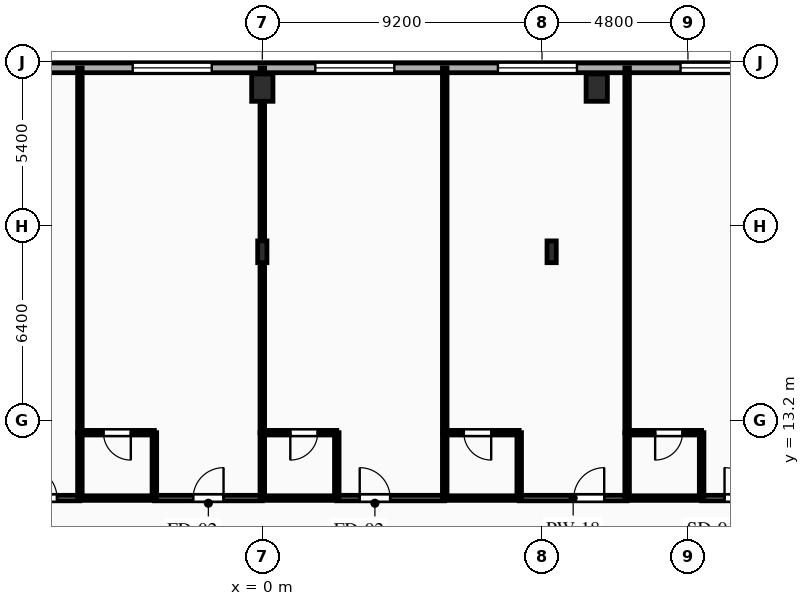
"""IFC4 building model, lengths in metres.
Left out: names, types, materials, properties, quantities, classifications, styles, units other than length and angle.
Written with IfcOpenShell. Run it as: python <this file> out.ifc"""

import sys

from ifc_helpers import new_model, si_unit, direction, frame, frame_2d, origin, origin_2d, place, context, subcontext, project, spatial, rectangle, i_section, extrude, element, fill, save


model = new_model("IFC4")
c1 = context("Model", 3, precision=1e-05, world=origin(), true_north=direction((0.0, 1.0)))
c2 = subcontext(c1, "Body", "Model", "MODEL_VIEW")
j1 = project(units=[si_unit("LENGTHUNIT", "METRE"), si_unit("PLANEANGLEUNIT", "RADIAN")], contexts=[c1])
p1 = place(None, origin())
s1 = spatial("IfcSite", under=j1, at=p1, CompositionType="ELEMENT")
p2 = place(p1, origin())
s2 = spatial("IfcBuilding", under=s1, at=p2, CompositionType="ELEMENT")
p3 = place(p2, frame((0.0, 0.0, 22.5)))
s3 = spatial("IfcBuildingStorey", under=s2, at=p3, CompositionType="ELEMENT", Elevation=22.5)
for number, where, z_axis, x_axis in (
    (1, (0.0, 24.15, 0.0), (0.0, 0.0, 1.0), (1.0, 0.0, 0.0)),
    (2, (11.0, 24.15, 0.0), (0.0, 0.0, 1.0), (1.0, 0.0, 0.0)),
):
    element("IfcColumn", number, at=place(p3, frame(where, z_axis=z_axis, x_axis=x_axis)), inside=s3, PredefinedType="COLUMN", context=c2, shape_type="SweptSolid", body=[
        extrude(rectangle(XDim=0.7, YDim=0.9, at=origin_2d()), origin(), (0.0, 0.0, 1.0), 4.5),
    ])
for number, where, z_axis, x_axis in (
    (3, (9.517, 18.75, 0.0), (0.0, 0.0, 1.0), (1.0, 0.0, 0.0)),
    (4, (0.0, 18.75, 0.0), (0.0, 0.0, 1.0), (1.0, 0.0, 0.0)),
):
    element("IfcColumn", number, at=place(p3, frame(where, z_axis=z_axis, x_axis=x_axis)), inside=s3, PredefinedType="COLUMN", context=c2, shape_type="SweptSolid", body=[
        extrude(i_section(OverallWidth=0.304, OverallDepth=0.716, WebThickness=0.021, FlangeThickness=0.04, FilletRadius=0.027, at=origin_2d()), origin(), (0.0, 0.0, 1.0), 4.5),
    ])
p4 = place(p3, frame((-36.8, 24.8, 0.0), z_axis=(0.0, 0.0, 1.0), x_axis=(1.0, 0.0, 0.0)))
e5 = element("IfcWall", 5, at=p4, inside=s3, PredefinedType="SOLIDWALL", context=c2, shape_type="SweptSolid", body=[
    extrude(rectangle(XDim=73.6, YDim=0.32, at=frame_2d((36.8, 0.0))), origin(), (0.0, 0.0, 1.0), 4.16),
])
p5 = place(p4, frame((1.079, 0.0, 0.85)))
e6 = element("IfcOpeningElement", 6, at=p5, cuts=e5, PredefinedType="OPENING", context=c2, shape_type="SweptSolid", body=[
    extrude(rectangle(XDim=2.3, YDim=2.4, at=frame_2d((1.15, 1.2))), frame((0.0, 0.17, 0.0), z_axis=(0.0, -1.0, 0.0), x_axis=(1.0, 0.0, 0.0)), (0.0, 0.0, 1.0), 0.34),
])
p6 = place(p4, frame((8.431, 0.0, 0.85)))
e7 = element("IfcOpeningElement", 7, at=p6, cuts=e5, PredefinedType="OPENING", context=c2, shape_type="SweptSolid", body=[
    extrude(rectangle(XDim=2.6, YDim=2.4, at=frame_2d((1.3, 1.2))), frame((0.0, 0.17, 0.0), z_axis=(0.0, -1.0, 0.0), x_axis=(1.0, 0.0, 0.0)), (0.0, 0.0, 1.0), 0.34),
])
p7 = place(p4, frame((13.316, 0.0, 0.85)))
e8 = element("IfcOpeningElement", 8, at=p7, cuts=e5, PredefinedType="OPENING", context=c2, shape_type="SweptSolid", body=[
    extrude(rectangle(XDim=1.1, YDim=1.85, at=frame_2d((0.55, 0.925))), frame((0.0, 0.17, 0.0), z_axis=(0.0, -1.0, 0.0), x_axis=(1.0, 0.0, 0.0)), (0.0, 0.0, 1.0), 0.34),
])
p8 = place(p4, frame((16.339, 0.0, 0.85)))
e9 = element("IfcOpeningElement", 9, at=p8, cuts=e5, PredefinedType="OPENING", context=c2, shape_type="SweptSolid", body=[
    extrude(rectangle(XDim=2.0, YDim=2.4, at=frame_2d((1.0, 1.2))), frame((0.0, 0.17, 0.0), z_axis=(0.0, -1.0, 0.0), x_axis=(1.0, 0.0, 0.0)), (0.0, 0.0, 1.0), 0.34),
])
p9 = place(p4, frame((21.875, 0.0, 0.85)))
e10 = element("IfcOpeningElement", 10, at=p9, cuts=e5, PredefinedType="OPENING", context=c2, shape_type="SweptSolid", body=[
    extrude(rectangle(XDim=2.3, YDim=2.4, at=frame_2d((1.15, 1.2))), frame((0.0, 0.17, 0.0), z_axis=(0.0, -1.0, 0.0), x_axis=(1.0, 0.0, 0.0)), (0.0, 0.0, 1.0), 0.34),
])
p10 = place(p4, frame((26.53, 0.0, 0.85)))
e11 = element("IfcOpeningElement", 11, at=p10, cuts=e5, PredefinedType="OPENING", context=c2, shape_type="SweptSolid", body=[
    extrude(rectangle(XDim=2.6, YDim=2.4, at=frame_2d((1.3, 1.2))), frame((0.0, 0.17, 0.0), z_axis=(0.0, -1.0, 0.0), x_axis=(1.0, 0.0, 0.0)), (0.0, 0.0, 1.0), 0.34),
])
p11 = place(p4, frame((32.537, 0.0, 0.85)))
e12 = element("IfcOpeningElement", 12, at=p11, cuts=e5, PredefinedType="OPENING", context=c2, shape_type="SweptSolid", body=[
    extrude(rectangle(XDim=2.6, YDim=2.4, at=frame_2d((1.3, 1.2))), frame((0.0, 0.17, 0.0), z_axis=(0.0, -1.0, 0.0), x_axis=(1.0, 0.0, 0.0)), (0.0, 0.0, 1.0), 0.34),
])
p12 = place(p4, frame((38.543, 0.0, 0.85)))
e13 = element("IfcOpeningElement", 13, at=p12, cuts=e5, PredefinedType="OPENING", context=c2, shape_type="SweptSolid", body=[
    extrude(rectangle(XDim=2.6, YDim=2.4, at=frame_2d((1.3, 1.2))), frame((0.0, 0.17, 0.0), z_axis=(0.0, -1.0, 0.0), x_axis=(1.0, 0.0, 0.0)), (0.0, 0.0, 1.0), 0.34),
])
p13 = place(p4, frame((44.55, 0.0, 0.85)))
e14 = element("IfcOpeningElement", 14, at=p13, cuts=e5, PredefinedType="OPENING", context=c2, shape_type="SweptSolid", body=[
    extrude(rectangle(XDim=2.6, YDim=2.4, at=frame_2d((1.3, 1.2))), frame((0.0, 0.17, 0.0), z_axis=(0.0, -1.0, 0.0), x_axis=(1.0, 0.0, 0.0)), (0.0, 0.0, 1.0), 0.34),
])
p14 = place(p4, frame((50.556, 0.0, 0.85)))
e15 = element("IfcOpeningElement", 15, at=p14, cuts=e5, PredefinedType="OPENING", context=c2, shape_type="SweptSolid", body=[
    extrude(rectangle(XDim=2.6, YDim=2.4, at=frame_2d((1.3, 1.2))), frame((0.0, 0.17, 0.0), z_axis=(0.0, -1.0, 0.0), x_axis=(1.0, 0.0, 0.0)), (0.0, 0.0, 1.0), 0.34),
])
p15 = place(p4, frame((55.341, 0.0, 0.85)))
e16 = element("IfcOpeningElement", 16, at=p15, cuts=e5, PredefinedType="OPENING", context=c2, shape_type="SweptSolid", body=[
    extrude(rectangle(XDim=2.0, YDim=2.4, at=frame_2d((1.0, 1.2))), frame((0.0, 0.17, 0.0), z_axis=(0.0, -1.0, 0.0), x_axis=(1.0, 0.0, 0.0)), (0.0, 0.0, 1.0), 0.34),
])
p16 = place(p4, frame((59.16, 0.0, 0.85)))
e17 = element("IfcOpeningElement", 17, at=p16, cuts=e5, PredefinedType="OPENING", context=c2, shape_type="SweptSolid", body=[
    extrude(rectangle(XDim=1.1, YDim=1.85, at=frame_2d((0.55, 0.925))), frame((0.0, 0.17, 0.0), z_axis=(0.0, -1.0, 0.0), x_axis=(1.0, 0.0, 0.0)), (0.0, 0.0, 1.0), 0.34),
])
p17 = place(p4, frame((62.649, 0.0, 0.85)))
e18 = element("IfcOpeningElement", 18, at=p17, cuts=e5, PredefinedType="OPENING", context=c2, shape_type="SweptSolid", body=[
    extrude(rectangle(XDim=2.6, YDim=2.4, at=frame_2d((1.3, 1.2))), frame((0.0, 0.17, 0.0), z_axis=(0.0, -1.0, 0.0), x_axis=(1.0, 0.0, 0.0)), (0.0, 0.0, 1.0), 0.34),
])
p18 = place(p4, frame((70.301, 0.0, 0.85)))
e19 = element("IfcOpeningElement", 19, at=p18, cuts=e5, PredefinedType="OPENING", context=c2, shape_type="SweptSolid", body=[
    extrude(rectangle(XDim=2.3, YDim=2.4, at=frame_2d((1.15, 1.2))), frame((0.0, 0.17, 0.0), z_axis=(0.0, -1.0, 0.0), x_axis=(1.0, 0.0, 0.0)), (0.0, 0.0, 1.0), 0.34),
])
p19 = place(p3, frame((-9.55, 10.65, 0.0), z_axis=(0.0, 0.0, 1.0), x_axis=(1.0, 0.0, 0.0)))
e20 = element("IfcWall", 20, at=p19, inside=s3, PredefinedType="PARTITIONING", context=c2, shape_type="SweptSolid", body=[
    extrude(rectangle(XDim=3.55, YDim=0.18, at=frame_2d((1.775, 0.0))), origin(), (0.0, 0.0, 1.0), 4.16),
])
p20 = place(p19, frame((1.796, 0.0, 0.0)))
e21 = element("IfcOpeningElement", 21, at=p20, cuts=e20, PredefinedType="OPENING", context=c2, shape_type="SweptSolid", body=[
    extrude(rectangle(XDim=1.0, YDim=2.15, at=frame_2d((0.5, 1.075))), frame((0.0, 0.1, 0.0), z_axis=(0.0, -1.0, 0.0), x_axis=(1.0, 0.0, 0.0)), (0.0, 0.0, 1.0), 0.2),
])
p21 = place(p3, frame((-3.55, 10.65, 0.0), z_axis=(0.0, 0.0, 1.0), x_axis=(1.0, 0.0, 0.0)))
e22 = element("IfcWall", 22, at=p21, inside=s3, PredefinedType="PARTITIONING", context=c2, shape_type="SweptSolid", body=[
    extrude(rectangle(XDim=3.55, YDim=0.18, at=frame_2d((1.775, 0.0))), origin(), (0.0, 0.0, 1.0), 4.16),
])
p22 = place(p21, frame((1.275, 0.0, 0.0)))
e23 = element("IfcOpeningElement", 23, at=p22, cuts=e22, PredefinedType="OPENING", context=c2, shape_type="SweptSolid", body=[
    extrude(rectangle(XDim=1.0, YDim=2.15, at=frame_2d((0.5, 1.075))), frame((0.0, 0.1, 0.0), z_axis=(0.0, -1.0, 0.0), x_axis=(1.0, 0.0, 0.0)), (0.0, 0.0, 1.0), 0.2),
])
p23 = place(p3, frame((-6.0, 10.65, 0.0), z_axis=(0.0, 0.0, 1.0), x_axis=(1.0, 0.0, 0.0)))
e24 = element("IfcWall", 24, at=p23, inside=s3, PredefinedType="PLUMBINGWALL", context=c2, shape_type="SweptSolid", body=[
    extrude(rectangle(XDim=2.45, YDim=0.15, at=frame_2d((1.225, 0.0))), origin(), (0.0, 0.0, 1.0), 4.16),
])
p24 = place(p3, frame((2.45, 10.65, 0.0), z_axis=(0.0, 0.0, 1.0), x_axis=(1.0, 0.0, 0.0)))
e25 = element("IfcWall", 25, at=p24, inside=s3, PredefinedType="PARTITIONING", context=c2, shape_type="SweptSolid", body=[
    extrude(rectangle(XDim=3.55, YDim=0.18, at=frame_2d((1.775, 0.0))), origin(), (0.0, 0.0, 1.0), 4.16),
])
p25 = place(p24, frame((0.754, 0.0, 0.0)))
e26 = element("IfcOpeningElement", 26, at=p25, cuts=e25, PredefinedType="OPENING", context=c2, shape_type="SweptSolid", body=[
    extrude(rectangle(XDim=1.0, YDim=2.15, at=frame_2d((0.5, 1.075))), frame((0.0, 0.1, 0.0), z_axis=(0.0, -1.0, 0.0), x_axis=(1.0, 0.0, 0.0)), (0.0, 0.0, 1.0), 0.2),
])
p26 = place(p3, frame((0.0, 10.65, 0.0), z_axis=(0.0, 0.0, 1.0), x_axis=(1.0, 0.0, 0.0)))
e27 = element("IfcWall", 27, at=p26, inside=s3, PredefinedType="PLUMBINGWALL", context=c2, shape_type="SweptSolid", body=[
    extrude(rectangle(XDim=2.45, YDim=0.15, at=frame_2d((1.225, 0.0))), origin(), (0.0, 0.0, 1.0), 4.16),
])
p27 = place(p3, frame((8.45, 10.65, 0.0), z_axis=(0.0, 0.0, 1.0), x_axis=(1.0, 0.0, 0.0)))
e28 = element("IfcWall", 28, at=p27, inside=s3, PredefinedType="PARTITIONING", context=c2, shape_type="SweptSolid", body=[
    extrude(rectangle(XDim=3.55, YDim=0.18, at=frame_2d((1.775, 0.0))), origin(), (0.0, 0.0, 1.0), 4.16),
])
p28 = place(p27, frame((1.796, 0.0, 0.0)))
e29 = element("IfcOpeningElement", 29, at=p28, cuts=e28, PredefinedType="OPENING", context=c2, shape_type="SweptSolid", body=[
    extrude(rectangle(XDim=1.0, YDim=2.15, at=frame_2d((0.5, 1.075))), frame((0.0, 0.1, 0.0), z_axis=(0.0, -1.0, 0.0), x_axis=(1.0, 0.0, 0.0)), (0.0, 0.0, 1.0), 0.2),
])
p29 = place(p3, frame((6.0, 10.65, 0.0), z_axis=(0.0, 0.0, 1.0), x_axis=(1.0, 0.0, 0.0)))
e30 = element("IfcWall", 30, at=p29, inside=s3, PredefinedType="PLUMBINGWALL", context=c2, shape_type="SweptSolid", body=[
    extrude(rectangle(XDim=2.45, YDim=0.15, at=frame_2d((1.225, 0.0))), origin(), (0.0, 0.0, 1.0), 4.16),
])
p30 = place(p3, frame((14.45, 10.65, 0.0), z_axis=(0.0, 0.0, 1.0), x_axis=(1.0, 0.0, 0.0)))
e31 = element("IfcWall", 31, at=p30, inside=s3, PredefinedType="PARTITIONING", context=c2, shape_type="SweptSolid", body=[
    extrude(rectangle(XDim=3.55, YDim=0.18, at=frame_2d((1.775, 0.0))), origin(), (0.0, 0.0, 1.0), 4.16),
])
p31 = place(p30, frame((0.754, 0.0, 0.0)))
e32 = element("IfcOpeningElement", 32, at=p31, cuts=e31, PredefinedType="OPENING", context=c2, shape_type="SweptSolid", body=[
    extrude(rectangle(XDim=1.0, YDim=2.15, at=frame_2d((0.5, 1.075))), frame((0.0, 0.1, 0.0), z_axis=(0.0, -1.0, 0.0), x_axis=(1.0, 0.0, 0.0)), (0.0, 0.0, 1.0), 0.2),
])
p32 = place(p3, frame((12.0, 10.65, 0.0), z_axis=(0.0, 0.0, 1.0), x_axis=(1.0, 0.0, 0.0)))
e33 = element("IfcWall", 33, at=p32, inside=s3, PredefinedType="PLUMBINGWALL", context=c2, shape_type="SweptSolid", body=[
    extrude(rectangle(XDim=2.45, YDim=0.15, at=frame_2d((1.225, 0.0))), origin(), (0.0, 0.0, 1.0), 4.16),
])
p33 = place(p3, frame((-6.0, 24.8, 0.0), z_axis=(0.0, 0.0, 1.0), x_axis=(0.0, -1.0, 0.0)))
e34 = element("IfcWall", 34, at=p33, inside=s3, PredefinedType="PARTITIONING", context=c2, shape_type="SweptSolid", body=[
    extrude(rectangle(XDim=12.0, YDim=0.15, at=frame_2d((6.0, 0.0))), origin(), (0.0, 0.0, 1.0), 4.16),
])
p34 = place(p3, frame((-6.0, 12.8, 0.0), z_axis=(0.0, 0.0, 1.0), x_axis=(0.0, -1.0, 0.0)))
e35 = element("IfcWall", 35, at=p34, inside=s3, PredefinedType="PLUMBINGWALL", context=c2, shape_type="SweptSolid", body=[
    extrude(rectangle(XDim=2.15, YDim=0.15, at=frame_2d((1.075, 0.0))), origin(), (0.0, 0.0, 1.0), 4.16),
])
p35 = place(p3, frame((-3.55, 12.8, 0.0), z_axis=(0.0, 0.0, 1.0), x_axis=(-1.0, 0.0, 0.0)))
e36 = element("IfcWall", 36, at=p35, inside=s3, PredefinedType="PLUMBINGWALL", context=c2, shape_type="SweptSolid", body=[
    extrude(rectangle(XDim=2.45, YDim=0.15, at=frame_2d((1.225, 0.0))), origin(), (0.0, 0.0, 1.0), 4.16),
])
p36 = place(p35, frame((0.775, 0.0, 0.0)))
e37 = element("IfcOpeningElement", 37, at=p36, cuts=e36, PredefinedType="OPENING", context=c2, shape_type="SweptSolid", body=[
    extrude(rectangle(XDim=0.9, YDim=2.1, at=frame_2d((0.45, 1.05))), frame((0.0, 0.085, 0.0), z_axis=(0.0, -1.0, 0.0), x_axis=(1.0, 0.0, 0.0)), (0.0, 0.0, 1.0), 0.17),
])
p37 = place(p3, frame((-3.55, 10.65, 0.0), z_axis=(0.0, 0.0, 1.0), x_axis=(0.0, 1.0, 0.0)))
e38 = element("IfcWall", 38, at=p37, inside=s3, PredefinedType="PLUMBINGWALL", context=c2, shape_type="SweptSolid", body=[
    extrude(rectangle(XDim=2.15, YDim=0.15, at=frame_2d((1.075, 0.0))), origin(), (0.0, 0.0, 1.0), 4.16),
])
p38 = place(p3, frame((0.0, 24.8, 0.0), z_axis=(0.0, 0.0, 1.0), x_axis=(0.0, -1.0, 0.0)))
e39 = element("IfcWall", 39, at=p38, inside=s3, PredefinedType="PARTITIONING", context=c2, shape_type="SweptSolid", body=[
    extrude(rectangle(XDim=12.0, YDim=0.15, at=frame_2d((6.0, 0.0))), origin(), (0.0, 0.0, 1.0), 3.545),
])
p39 = place(p3, frame((0.0, 12.8, 0.0), z_axis=(0.0, 0.0, 1.0), x_axis=(0.0, -1.0, 0.0)))
e40 = element("IfcWall", 40, at=p39, inside=s3, PredefinedType="PLUMBINGWALL", context=c2, shape_type="SweptSolid", body=[
    extrude(rectangle(XDim=2.15, YDim=0.15, at=frame_2d((1.075, 0.0))), origin(), (0.0, 0.0, 1.0), 4.16),
])
p40 = place(p3, frame((2.45, 12.8, 0.0), z_axis=(0.0, 0.0, 1.0), x_axis=(-1.0, 0.0, 0.0)))
e41 = element("IfcWall", 41, at=p40, inside=s3, PredefinedType="PLUMBINGWALL", context=c2, shape_type="SweptSolid", body=[
    extrude(rectangle(XDim=2.45, YDim=0.15, at=frame_2d((1.225, 0.0))), origin(), (0.0, 0.0, 1.0), 4.16),
])
p41 = place(p40, frame((0.629, 0.0, 0.0)))
e42 = element("IfcOpeningElement", 42, at=p41, cuts=e41, PredefinedType="OPENING", context=c2, shape_type="SweptSolid", body=[
    extrude(rectangle(XDim=0.9, YDim=2.1, at=frame_2d((0.45, 1.05))), frame((0.0, 0.085, 0.0), z_axis=(0.0, -1.0, 0.0), x_axis=(1.0, 0.0, 0.0)), (0.0, 0.0, 1.0), 0.17),
])
p42 = place(p3, frame((2.45, 10.65, 0.0), z_axis=(0.0, 0.0, 1.0), x_axis=(0.0, 1.0, 0.0)))
e43 = element("IfcWall", 43, at=p42, inside=s3, PredefinedType="PLUMBINGWALL", context=c2, shape_type="SweptSolid", body=[
    extrude(rectangle(XDim=2.15, YDim=0.15, at=frame_2d((1.075, 0.0))), origin(), (0.0, 0.0, 1.0), 4.16),
])
p43 = place(p3, frame((6.0, 24.8, 0.0), z_axis=(0.0, 0.0, 1.0), x_axis=(0.0, -1.0, 0.0)))
e44 = element("IfcWall", 44, at=p43, inside=s3, PredefinedType="PARTITIONING", context=c2, shape_type="SweptSolid", body=[
    extrude(rectangle(XDim=12.0, YDim=0.15, at=frame_2d((6.0, 0.0))), origin(), (0.0, 0.0, 1.0), 4.16),
])
p44 = place(p3, frame((6.0, 12.8, 0.0), z_axis=(0.0, 0.0, 1.0), x_axis=(0.0, -1.0, 0.0)))
e45 = element("IfcWall", 45, at=p44, inside=s3, PredefinedType="PLUMBINGWALL", context=c2, shape_type="SweptSolid", body=[
    extrude(rectangle(XDim=2.15, YDim=0.15, at=frame_2d((1.075, 0.0))), origin(), (0.0, 0.0, 1.0), 4.16),
])
p45 = place(p3, frame((8.45, 12.8, 0.0), z_axis=(0.0, 0.0, 1.0), x_axis=(-1.0, 0.0, 0.0)))
e46 = element("IfcWall", 46, at=p45, inside=s3, PredefinedType="PLUMBINGWALL", context=c2, shape_type="SweptSolid", body=[
    extrude(rectangle(XDim=2.45, YDim=0.15, at=frame_2d((1.225, 0.0))), origin(), (0.0, 0.0, 1.0), 4.16),
])
p46 = place(p45, frame((0.921, 0.0, 0.0)))
e47 = element("IfcOpeningElement", 47, at=p46, cuts=e46, PredefinedType="OPENING", context=c2, shape_type="SweptSolid", body=[
    extrude(rectangle(XDim=0.9, YDim=2.1, at=frame_2d((0.45, 1.05))), frame((0.0, 0.085, 0.0), z_axis=(0.0, -1.0, 0.0), x_axis=(1.0, 0.0, 0.0)), (0.0, 0.0, 1.0), 0.17),
])
p47 = place(p3, frame((8.45, 10.65, 0.0), z_axis=(0.0, 0.0, 1.0), x_axis=(0.0, 1.0, 0.0)))
e48 = element("IfcWall", 48, at=p47, inside=s3, PredefinedType="PLUMBINGWALL", context=c2, shape_type="SweptSolid", body=[
    extrude(rectangle(XDim=2.15, YDim=0.15, at=frame_2d((1.075, 0.0))), origin(), (0.0, 0.0, 1.0), 4.16),
])
p48 = place(p3, frame((12.0, 24.8, 0.0), z_axis=(0.0, 0.0, 1.0), x_axis=(0.0, -1.0, 0.0)))
e49 = element("IfcWall", 49, at=p48, inside=s3, PredefinedType="PARTITIONING", context=c2, shape_type="SweptSolid", body=[
    extrude(rectangle(XDim=12.0, YDim=0.15, at=frame_2d((6.0, 0.0))), origin(), (0.0, 0.0, 1.0), 4.16),
])
p49 = place(p3, frame((12.0, 12.8, 0.0), z_axis=(0.0, 0.0, 1.0), x_axis=(0.0, -1.0, 0.0)))
e50 = element("IfcWall", 50, at=p49, inside=s3, PredefinedType="PLUMBINGWALL", context=c2, shape_type="SweptSolid", body=[
    extrude(rectangle(XDim=2.15, YDim=0.15, at=frame_2d((1.075, 0.0))), origin(), (0.0, 0.0, 1.0), 4.16),
])
p50 = place(p3, frame((14.45, 12.8, 0.0), z_axis=(0.0, 0.0, 1.0), x_axis=(-1.0, 0.0, 0.0)))
e51 = element("IfcWall", 51, at=p50, inside=s3, PredefinedType="PLUMBINGWALL", context=c2, shape_type="SweptSolid", body=[
    extrude(rectangle(XDim=2.45, YDim=0.15, at=frame_2d((1.225, 0.0))), origin(), (0.0, 0.0, 1.0), 4.16),
])
p51 = place(p50, frame((0.629, 0.0, 0.0)))
e52 = element("IfcOpeningElement", 52, at=p51, cuts=e51, PredefinedType="OPENING", context=c2, shape_type="SweptSolid", body=[
    extrude(rectangle(XDim=0.9, YDim=2.1, at=frame_2d((0.45, 1.05))), frame((0.0, 0.085, 0.0), z_axis=(0.0, -1.0, 0.0), x_axis=(1.0, 0.0, 0.0)), (0.0, 0.0, 1.0), 0.17),
])
p52 = place(p3, frame((14.45, 10.65, 0.0), z_axis=(0.0, 0.0, 1.0), x_axis=(0.0, 1.0, 0.0)))
e53 = element("IfcWall", 53, at=p52, inside=s3, PredefinedType="PLUMBINGWALL", context=c2, shape_type="SweptSolid", body=[
    extrude(rectangle(XDim=2.15, YDim=0.15, at=frame_2d((1.075, 0.0))), origin(), (0.0, 0.0, 1.0), 4.16),
])
p53 = place(p11, origin())
e54 = element("IfcWindow", 54, at=p53, inside=s3, PartitioningType="SINGLE_PANEL", PredefinedType="WINDOW", context=c2, shape_type="SweptSolid", body=[
    extrude(rectangle(XDim=2.6, YDim=2.4, at=frame_2d((1.3, 1.2))), frame((0.0, 0.03, 0.0), z_axis=(0.0, -1.0, 0.0), x_axis=(1.0, 0.0, 0.0)), (0.0, 0.0, 1.0), 0.06),
])
fill(e12, e54)
p54 = place(p12, origin())
e55 = element("IfcWindow", 55, at=p54, inside=s3, PartitioningType="SINGLE_PANEL", PredefinedType="WINDOW", context=c2, shape_type="SweptSolid", body=[
    extrude(rectangle(XDim=2.6, YDim=2.4, at=frame_2d((1.3, 1.2))), frame((0.0, 0.03, 0.0), z_axis=(0.0, -1.0, 0.0), x_axis=(1.0, 0.0, 0.0)), (0.0, 0.0, 1.0), 0.06),
])
fill(e13, e55)
p55 = place(p13, origin())
e56 = element("IfcWindow", 56, at=p55, inside=s3, PartitioningType="SINGLE_PANEL", PredefinedType="WINDOW", context=c2, shape_type="SweptSolid", body=[
    extrude(rectangle(XDim=2.6, YDim=2.4, at=frame_2d((1.3, 1.2))), frame((0.0, 0.03, 0.0), z_axis=(0.0, -1.0, 0.0), x_axis=(1.0, 0.0, 0.0)), (0.0, 0.0, 1.0), 0.06),
])
fill(e14, e56)
p56 = place(p14, origin())
e57 = element("IfcWindow", 57, at=p56, inside=s3, PartitioningType="SINGLE_PANEL", PredefinedType="WINDOW", context=c2, shape_type="SweptSolid", body=[
    extrude(rectangle(XDim=2.6, YDim=2.4, at=frame_2d((1.3, 1.2))), frame((0.0, 0.03, 0.0), z_axis=(0.0, -1.0, 0.0), x_axis=(1.0, 0.0, 0.0)), (0.0, 0.0, 1.0), 0.06),
])
fill(e15, e57)
p57 = place(p20, origin())
e58 = element("IfcDoor", 58, at=p57, inside=s3, OperationType="SINGLE_SWING_LEFT", PredefinedType="DOOR", context=c2, shape_type="SweptSolid", body=[
    extrude(rectangle(XDim=1.0, YDim=2.15, at=frame_2d((0.5, 1.075))), frame((0.0, 0.025, 0.0), z_axis=(0.0, -1.0, 0.0), x_axis=(1.0, 0.0, 0.0)), (0.0, 0.0, 1.0), 0.05),
])
fill(e21, e58)
p58 = place(p22, origin())
e59 = element("IfcDoor", 59, at=p58, inside=s3, OperationType="SINGLE_SWING_RIGHT", PredefinedType="DOOR", context=c2, shape_type="SweptSolid", body=[
    extrude(rectangle(XDim=1.0, YDim=2.15, at=frame_2d((0.5, 1.075))), frame((0.0, 0.025, 0.0), z_axis=(0.0, -1.0, 0.0), x_axis=(1.0, 0.0, 0.0)), (0.0, 0.0, 1.0), 0.05),
])
fill(e23, e59)
p59 = place(p25, origin())
e60 = element("IfcDoor", 60, at=p59, inside=s3, OperationType="SINGLE_SWING_LEFT", PredefinedType="DOOR", context=c2, shape_type="SweptSolid", body=[
    extrude(rectangle(XDim=1.0, YDim=2.15, at=frame_2d((0.5, 1.075))), frame((0.0, 0.025, 0.0), z_axis=(0.0, -1.0, 0.0), x_axis=(1.0, 0.0, 0.0)), (0.0, 0.0, 1.0), 0.05),
])
fill(e26, e60)
p60 = place(p28, origin())
e61 = element("IfcDoor", 61, at=p60, inside=s3, OperationType="SINGLE_SWING_RIGHT", PredefinedType="DOOR", context=c2, shape_type="SweptSolid", body=[
    extrude(rectangle(XDim=1.0, YDim=2.15, at=frame_2d((0.5, 1.075))), frame((0.0, 0.025, 0.0), z_axis=(0.0, -1.0, 0.0), x_axis=(1.0, 0.0, 0.0)), (0.0, 0.0, 1.0), 0.05),
])
fill(e29, e61)
p61 = place(p31, origin())
e62 = element("IfcDoor", 62, at=p61, inside=s3, OperationType="SINGLE_SWING_LEFT", PredefinedType="DOOR", context=c2, shape_type="SweptSolid", body=[
    extrude(rectangle(XDim=1.0, YDim=2.15, at=frame_2d((0.5, 1.075))), frame((0.0, 0.025, 0.0), z_axis=(0.0, -1.0, 0.0), x_axis=(1.0, 0.0, 0.0)), (0.0, 0.0, 1.0), 0.05),
])
fill(e32, e62)
p62 = place(p36, origin())
e63 = element("IfcDoor", 63, at=p62, inside=s3, OperationType="SINGLE_SWING_LEFT", PredefinedType="DOOR", context=c2, shape_type="SweptSolid", body=[
    extrude(rectangle(XDim=0.9, YDim=2.1, at=frame_2d((0.45, 1.05))), frame((0.0, 0.025, 0.0), z_axis=(0.0, -1.0, 0.0), x_axis=(1.0, 0.0, 0.0)), (0.0, 0.0, 1.0), 0.05),
])
fill(e37, e63)
p63 = place(p41, origin())
e64 = element("IfcDoor", 64, at=p63, inside=s3, OperationType="SINGLE_SWING_RIGHT", PredefinedType="DOOR", context=c2, shape_type="SweptSolid", body=[
    extrude(rectangle(XDim=0.9, YDim=2.1, at=frame_2d((0.45, 1.05))), frame((0.0, 0.025, 0.0), z_axis=(0.0, -1.0, 0.0), x_axis=(1.0, 0.0, 0.0)), (0.0, 0.0, 1.0), 0.05),
])
fill(e42, e64)
p64 = place(p46, origin())
e65 = element("IfcDoor", 65, at=p64, inside=s3, OperationType="SINGLE_SWING_LEFT", PredefinedType="DOOR", context=c2, shape_type="SweptSolid", body=[
    extrude(rectangle(XDim=0.9, YDim=2.1, at=frame_2d((0.45, 1.05))), frame((0.0, 0.025, 0.0), z_axis=(0.0, -1.0, 0.0), x_axis=(1.0, 0.0, 0.0)), (0.0, 0.0, 1.0), 0.05),
])
fill(e47, e65)
p65 = place(p51, origin())
e66 = element("IfcDoor", 66, at=p65, inside=s3, OperationType="SINGLE_SWING_RIGHT", PredefinedType="DOOR", context=c2, shape_type="SweptSolid", body=[
    extrude(rectangle(XDim=0.9, YDim=2.1, at=frame_2d((0.45, 1.05))), frame((0.0, 0.025, 0.0), z_axis=(0.0, -1.0, 0.0), x_axis=(1.0, 0.0, 0.0)), (0.0, 0.0, 1.0), 0.05),
])
fill(e52, e66)
save(model, sys.argv[1])
